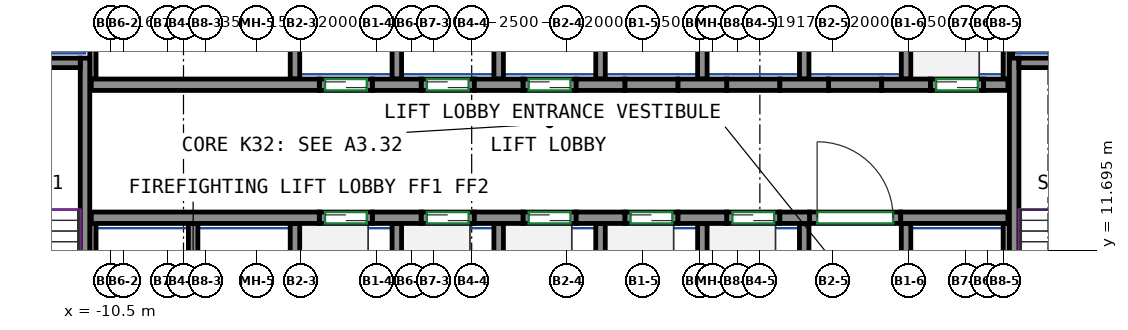
"""IFC4 building model, lengths in metres.
Left out: names, types, materials, properties, quantities, classifications, styles, units other than length and angle.
Written with IfcOpenShell. Run it as: python <this file> out.ifc"""

import sys

from ifc_helpers import new_model, si_unit, direction, frame, frame_2d, origin, place, context, subcontext, project, spatial, rectangle, extrude, source, transform, mapped, element, fill, save


model = new_model("IFC4")
c1 = context("Model", 3, precision=1e-05, world=origin(), true_north=direction((0.0, 1.0)))
c2 = subcontext(c1, "Body", "Model", "MODEL_VIEW")
j1 = project(units=[si_unit("LENGTHUNIT", "METRE"), si_unit("PLANEANGLEUNIT", "RADIAN")], contexts=[c1])
p1 = place(None, origin())
s1 = spatial("IfcSite", under=j1, at=p1, CompositionType="ELEMENT")
p2 = place(p1, origin())
s2 = spatial("IfcBuilding", under=s1, at=p2, CompositionType="ELEMENT")
p3 = place(p2, frame((0.0, 0.0, 138.5)))
s3 = spatial("IfcBuildingStorey", under=s2, at=p3, CompositionType="ELEMENT", Elevation=138.5)
m1 = source(origin(), c2, "Body", "SweptSolid", [
    extrude(rectangle(XDim=7.75, YDim=0.25, at=frame_2d((3.875, 0.0))), origin(), (0.0, 0.0, 1.0), 5.12),
])
p4 = place(p3, frame((-11.175, 9.0, 0.0), z_axis=(0.0, 0.0, 1.0), x_axis=(0.0, 1.0, 0.0)))
e1 = element("IfcWall", 1, at=p4, inside=s3, PredefinedType="SHEAR", context=c2, shape_type="MappedRepresentation", body=[
    mapped(m1, transform((0.0, 0.0, 0.0))),
])
m2 = source(origin(), c2, "Body", "SweptSolid", [
    extrude(rectangle(XDim=3.7, YDim=0.25, at=frame_2d((1.85, 0.0))), origin(), (0.0, 0.0, 1.0), 5.12),
])
p5 = place(p3, frame((-15.0, 16.625, 0.0), z_axis=(0.0, 0.0, 1.0), x_axis=(1.0, 0.0, 0.0)))
e2 = element("IfcWall", 2, at=p5, inside=s3, PredefinedType="SHEAR", context=c2, shape_type="MappedRepresentation", body=[
    mapped(m2, transform((0.0, 0.0, 0.0))),
])
p6 = place(p3, frame((13.275, 9.0, 0.0), z_axis=(0.0, 0.0, 1.0), x_axis=(0.0, 1.0, 0.0)))
e3 = element("IfcWall", 3, at=p6, inside=s3, PredefinedType="SHEAR", context=c2, shape_type="MappedRepresentation", body=[
    mapped(m1, transform((0.0, 0.0, 0.0))),
])
m3 = source(origin(), c2, "Body", "SweptSolid", [
    extrude(rectangle(XDim=3.7, YDim=0.25, at=frame_2d((1.85, 0.0))), origin(), (0.0, 0.0, 1.0), 5.12),
])
p7 = place(p3, frame((13.4, 16.625, 0.0), z_axis=(0.0, 0.0, 1.0), x_axis=(1.0, 0.0, 0.0)))
e4 = element("IfcWall", 4, at=p7, inside=s3, PredefinedType="SHEAR", context=c2, shape_type="MappedRepresentation", body=[
    mapped(m3, transform((0.0, 0.0, 0.0))),
])
m4 = source(origin(), c2, "Body", "SweptSolid", [
    extrude(rectangle(XDim=6.0, YDim=0.3, at=frame_2d((3.0, 0.0))), origin(), (0.0, 0.0, 1.0), 5.12),
])
p8 = place(p3, frame((-11.01, 12.55, 0.0), z_axis=(0.0, 0.0, 1.0), x_axis=(1.0, 0.0, 0.0)))
e5 = element("IfcWall", 5, at=p8, inside=s3, PredefinedType="SHEAR", context=c2, shape_type="MappedRepresentation", body=[
    mapped(m4, transform((0.0, 0.0, 0.0))),
])
m5 = source(origin(), c2, "Body", "SweptSolid", [
    extrude(rectangle(XDim=1.28, YDim=0.3, at=frame_2d((0.64, 0.0))), origin(), (0.0, 0.0, 1.0), 5.12),
])
for number, where, z_axis, x_axis in (
    (6, (-3.61, 12.55, 0.0), (0.0, 0.0, 1.0), (1.0, 0.0, 0.0)),
    (7, (-0.93, 12.55, 0.0), (0.0, 0.0, 1.0), (1.0, 0.0, 0.0)),
    (8, (1.75, 12.55, 0.0), (0.0, 0.0, 1.0), (1.0, 0.0, 0.0)),
    (9, (4.43, 12.55, 0.0), (0.0, 0.0, 1.0), (1.0, 0.0, 0.0)),
):
    element("IfcWall", number, at=place(p3, frame(where, z_axis=z_axis, x_axis=x_axis)), inside=s3, PredefinedType="SHEAR", context=c2, shape_type="MappedRepresentation", body=[
        mapped(m5, transform((0.0, 0.0, 0.0))),
    ])
m6 = source(origin(), c2, "Body", "SweptSolid", [
    extrude(rectangle(XDim=0.78, YDim=0.3, at=frame_2d((0.39, 0.0))), origin(), (0.0, 0.0, 1.0), 5.12),
])
p9 = place(p3, frame((7.11, 12.55, 0.0), z_axis=(0.0, 0.0, 1.0), x_axis=(1.0, 0.0, 0.0)))
e10 = element("IfcWall", 10, at=p9, inside=s3, PredefinedType="SHEAR", context=c2, shape_type="MappedRepresentation", body=[
    mapped(m6, transform((0.0, 0.0, 0.0))),
])
m7 = source(origin(), c2, "Body", "SweptSolid", [
    extrude(rectangle(XDim=2.82, YDim=0.3, at=frame_2d((1.41, 0.0))), origin(), (0.0, 0.0, 1.0), 5.12),
])
p10 = place(p3, frame((10.29, 12.55, 0.0), z_axis=(0.0, 0.0, 1.0), x_axis=(1.0, 0.0, 0.0)))
e11 = element("IfcWall", 11, at=p10, inside=s3, PredefinedType="SHEAR", context=c2, shape_type="MappedRepresentation", body=[
    mapped(m7, transform((0.0, 0.0, 0.0))),
])
p11 = place(p3, frame((-11.01, 16.05, 0.0), z_axis=(0.0, 0.0, 1.0), x_axis=(1.0, 0.0, 0.0)))
e12 = element("IfcWall", 12, at=p11, inside=s3, PredefinedType="SHEAR", context=c2, shape_type="MappedRepresentation", body=[
    mapped(m4, transform((0.0, 0.0, 0.0))),
])
for number, where, z_axis, x_axis in (
    (13, (-3.61, 16.05, 0.0), (0.0, 0.0, 1.0), (1.0, 0.0, 0.0)),
    (14, (-0.93, 16.05, 0.0), (0.0, 0.0, 1.0), (1.0, 0.0, 0.0)),
    (15, (1.75, 16.05, 0.0), (0.0, 0.0, 1.0), (1.0, 0.0, 0.0)),
    (16, (4.43, 16.05, 0.0), (0.0, 0.0, 1.0), (1.0, 0.0, 0.0)),
):
    element("IfcWall", number, at=place(p3, frame(where, z_axis=z_axis, x_axis=x_axis)), inside=s3, PredefinedType="SHEAR", context=c2, shape_type="MappedRepresentation", body=[
        mapped(m5, transform((0.0, 0.0, 0.0))),
    ])
m8 = source(origin(), c2, "Body", "SweptSolid", [
    extrude(rectangle(XDim=1.28, YDim=0.3, at=frame_2d((0.64, 0.0))), origin(), (0.0, 0.0, 1.0), 5.12),
])
p12 = place(p3, frame((7.11, 16.05, 0.0), z_axis=(0.0, 0.0, 1.0), x_axis=(1.0, 0.0, 0.0)))
e17 = element("IfcWall", 17, at=p12, inside=s3, PredefinedType="SHEAR", context=c2, shape_type="MappedRepresentation", body=[
    mapped(m8, transform((0.0, 0.0, 0.0))),
])
p13 = place(p3, frame((9.79, 16.05, 0.0), z_axis=(0.0, 0.0, 1.0), x_axis=(1.0, 0.0, 0.0)))
e18 = element("IfcWall", 18, at=p13, inside=s3, PredefinedType="SHEAR", context=c2, shape_type="MappedRepresentation", body=[
    mapped(m5, transform((0.0, 0.0, 0.0))),
])
m9 = source(origin(), c2, "Body", "SweptSolid", [
    extrude(rectangle(XDim=0.64, YDim=0.3, at=frame_2d((0.32, 0.0))), origin(), (0.0, 0.0, 1.0), 5.12),
])
p14 = place(p3, frame((12.47, 16.05, 0.0), z_axis=(0.0, 0.0, 1.0), x_axis=(1.0, 0.0, 0.0)))
e19 = element("IfcWall", 19, at=p14, inside=s3, PredefinedType="SHEAR", context=c2, shape_type="MappedRepresentation", body=[
    mapped(m9, transform((0.0, 0.0, 0.0))),
])
m10 = source(origin(), c2, "Body", "SweptSolid", [
    extrude(rectangle(XDim=1.4, YDim=0.3, at=frame_2d((0.7, 0.0))), origin(), (0.0, 0.0, 1.0), 5.12),
])
p15 = place(p3, frame((-5.01, 12.55, 0.0), z_axis=(0.0, 0.0, 1.0), x_axis=(1.0, 0.0, 0.0)))
e20 = element("IfcWall", 20, at=p15, inside=s3, PredefinedType="PARTITIONING", context=c2, shape_type="MappedRepresentation", body=[
    mapped(m10, transform((0.0, 0.0, 0.0))),
])
p16 = place(p15, frame((0.15, 0.0, 0.0)))
e21 = element("IfcOpeningElement", 21, at=p16, cuts=e20, PredefinedType="OPENING", context=c2, shape_type="SweptSolid", body=[
    extrude(rectangle(XDim=1.1, YDim=2.1, at=frame_2d((0.55, 1.05))), frame((0.0, 0.16, 0.0), z_axis=(0.0, -1.0, 0.0), x_axis=(1.0, 0.0, 0.0)), (0.0, 0.0, 1.0), 0.32),
])
m11 = source(origin(), c2, "Body", "SweptSolid", [
    extrude(rectangle(XDim=1.4, YDim=0.3, at=frame_2d((0.7, 0.0))), origin(), (0.0, 0.0, 1.0), 5.12),
])
p17 = place(p3, frame((-2.33, 12.55, 0.0), z_axis=(0.0, 0.0, 1.0), x_axis=(1.0, 0.0, 0.0)))
e22 = element("IfcWall", 22, at=p17, inside=s3, PredefinedType="PARTITIONING", context=c2, shape_type="MappedRepresentation", body=[
    mapped(m11, transform((0.0, 0.0, 0.0))),
])
p18 = place(p17, frame((0.15, 0.0, 0.0)))
e23 = element("IfcOpeningElement", 23, at=p18, cuts=e22, PredefinedType="OPENING", context=c2, shape_type="SweptSolid", body=[
    extrude(rectangle(XDim=1.1, YDim=2.1, at=frame_2d((0.55, 1.05))), frame((0.0, 0.16, 0.0), z_axis=(0.0, -1.0, 0.0), x_axis=(1.0, 0.0, 0.0)), (0.0, 0.0, 1.0), 0.32),
])
p19 = place(p3, frame((0.35, 12.55, 0.0), z_axis=(0.0, 0.0, 1.0), x_axis=(1.0, 0.0, 0.0)))
e24 = element("IfcWall", 24, at=p19, inside=s3, PredefinedType="PARTITIONING", context=c2, shape_type="MappedRepresentation", body=[
    mapped(m10, transform((0.0, 0.0, 0.0))),
])
p20 = place(p19, frame((0.15, 0.0, 0.0)))
e25 = element("IfcOpeningElement", 25, at=p20, cuts=e24, PredefinedType="OPENING", context=c2, shape_type="SweptSolid", body=[
    extrude(rectangle(XDim=1.1, YDim=2.1, at=frame_2d((0.55, 1.05))), frame((0.0, 0.16, 0.0), z_axis=(0.0, -1.0, 0.0), x_axis=(1.0, 0.0, 0.0)), (0.0, 0.0, 1.0), 0.32),
])
p21 = place(p3, frame((3.03, 12.55, 0.0), z_axis=(0.0, 0.0, 1.0), x_axis=(1.0, 0.0, 0.0)))
e26 = element("IfcWall", 26, at=p21, inside=s3, PredefinedType="PARTITIONING", context=c2, shape_type="MappedRepresentation", body=[
    mapped(m10, transform((0.0, 0.0, 0.0))),
])
p22 = place(p21, frame((0.15, 0.0, 0.0)))
e27 = element("IfcOpeningElement", 27, at=p22, cuts=e26, PredefinedType="OPENING", context=c2, shape_type="SweptSolid", body=[
    extrude(rectangle(XDim=1.1, YDim=2.1, at=frame_2d((0.55, 1.05))), frame((0.0, 0.16, 0.0), z_axis=(0.0, -1.0, 0.0), x_axis=(1.0, 0.0, 0.0)), (0.0, 0.0, 1.0), 0.32),
])
p23 = place(p3, frame((5.71, 12.55, 0.0), z_axis=(0.0, 0.0, 1.0), x_axis=(1.0, 0.0, 0.0)))
e28 = element("IfcWall", 28, at=p23, inside=s3, PredefinedType="PARTITIONING", context=c2, shape_type="MappedRepresentation", body=[
    mapped(m11, transform((0.0, 0.0, 0.0))),
])
p24 = place(p23, frame((0.15, 0.0, 0.0)))
e29 = element("IfcOpeningElement", 29, at=p24, cuts=e28, PredefinedType="OPENING", context=c2, shape_type="SweptSolid", body=[
    extrude(rectangle(XDim=1.1, YDim=2.1, at=frame_2d((0.55, 1.05))), frame((0.0, 0.16, 0.0), z_axis=(0.0, -1.0, 0.0), x_axis=(1.0, 0.0, 0.0)), (0.0, 0.0, 1.0), 0.32),
])
p25 = place(p3, frame((11.07, 16.05, 0.0), z_axis=(0.0, 0.0, 1.0), x_axis=(1.0, 0.0, 0.0)))
e30 = element("IfcWall", 30, at=p25, inside=s3, PredefinedType="PARTITIONING", context=c2, shape_type="MappedRepresentation", body=[
    mapped(m10, transform((0.0, 0.0, 0.0))),
])
p26 = place(p25, frame((0.15, 0.0, 0.0)))
e31 = element("IfcOpeningElement", 31, at=p26, cuts=e30, PredefinedType="OPENING", context=c2, shape_type="SweptSolid", body=[
    extrude(rectangle(XDim=1.1, YDim=2.1, at=frame_2d((0.55, 1.05))), frame((0.0, 0.16, 0.0), z_axis=(0.0, -1.0, 0.0), x_axis=(1.0, 0.0, 0.0)), (0.0, 0.0, 1.0), 0.32),
])
m12 = source(origin(), c2, "Body", "SweptSolid", [
    extrude(rectangle(XDim=2.4, YDim=0.3, at=frame_2d((1.2, 0.0))), origin(), (0.0, 0.0, 1.0), 5.12),
])
p27 = place(p3, frame((7.89, 12.55, 0.0), z_axis=(0.0, 0.0, 1.0), x_axis=(1.0, 0.0, 0.0)))
e32 = element("IfcWall", 32, at=p27, inside=s3, PredefinedType="PARTITIONING", context=c2, shape_type="MappedRepresentation", body=[
    mapped(m12, transform((0.0, 0.0, 0.0))),
])
p28 = place(p27, frame((0.2, 0.0, 0.0)))
e33 = element("IfcOpeningElement", 33, at=p28, cuts=e32, PredefinedType="OPENING", context=c2, shape_type="SweptSolid", body=[
    extrude(rectangle(XDim=2.0, YDim=2.1, at=frame_2d((1.0, 1.05))), frame((0.0, 0.16, 0.0), z_axis=(0.0, -1.0, 0.0), x_axis=(1.0, 0.0, 0.0)), (0.0, 0.0, 1.0), 0.32),
])
p29 = place(p3, frame((-5.01, 16.05, 0.0), z_axis=(0.0, 0.0, 1.0), x_axis=(1.0, 0.0, 0.0)))
e34 = element("IfcWall", 34, at=p29, inside=s3, PredefinedType="PARTITIONING", context=c2, shape_type="MappedRepresentation", body=[
    mapped(m10, transform((0.0, 0.0, 0.0))),
])
p30 = place(p29, frame((0.15, 0.0, 0.0)))
e35 = element("IfcOpeningElement", 35, at=p30, cuts=e34, PredefinedType="OPENING", context=c2, shape_type="SweptSolid", body=[
    extrude(rectangle(XDim=1.1, YDim=2.1, at=frame_2d((0.55, 1.05))), frame((0.0, 0.16, 0.0), z_axis=(0.0, -1.0, 0.0), x_axis=(1.0, 0.0, 0.0)), (0.0, 0.0, 1.0), 0.32),
])
p31 = place(p3, frame((-2.33, 16.05, 0.0), z_axis=(0.0, 0.0, 1.0), x_axis=(1.0, 0.0, 0.0)))
e36 = element("IfcWall", 36, at=p31, inside=s3, PredefinedType="PARTITIONING", context=c2, shape_type="MappedRepresentation", body=[
    mapped(m11, transform((0.0, 0.0, 0.0))),
])
p32 = place(p31, frame((0.15, 0.0, 0.0)))
e37 = element("IfcOpeningElement", 37, at=p32, cuts=e36, PredefinedType="OPENING", context=c2, shape_type="SweptSolid", body=[
    extrude(rectangle(XDim=1.1, YDim=2.1, at=frame_2d((0.55, 1.05))), frame((0.0, 0.16, 0.0), z_axis=(0.0, -1.0, 0.0), x_axis=(1.0, 0.0, 0.0)), (0.0, 0.0, 1.0), 0.32),
])
p33 = place(p3, frame((0.35, 16.05, 0.0), z_axis=(0.0, 0.0, 1.0), x_axis=(1.0, 0.0, 0.0)))
e38 = element("IfcWall", 38, at=p33, inside=s3, PredefinedType="PARTITIONING", context=c2, shape_type="MappedRepresentation", body=[
    mapped(m10, transform((0.0, 0.0, 0.0))),
])
p34 = place(p33, frame((0.15, 0.0, 0.0)))
e39 = element("IfcOpeningElement", 39, at=p34, cuts=e38, PredefinedType="OPENING", context=c2, shape_type="SweptSolid", body=[
    extrude(rectangle(XDim=1.1, YDim=2.1, at=frame_2d((0.55, 1.05))), frame((0.0, 0.16, 0.0), z_axis=(0.0, -1.0, 0.0), x_axis=(1.0, 0.0, 0.0)), (0.0, 0.0, 1.0), 0.32),
])
p35 = place(p3, frame((3.03, 16.05, 0.0), z_axis=(0.0, 0.0, 1.0), x_axis=(1.0, 0.0, 0.0)))
e40 = element("IfcWall", 40, at=p35, inside=s3, PredefinedType="PARTITIONING", context=c2, shape_type="MappedRepresentation", body=[
    mapped(m10, transform((0.0, 0.0, 0.0))),
])
for number, where, z_axis, x_axis in (
    (41, (5.71, 16.05, 0.0), (0.0, 0.0, 1.0), (1.0, 0.0, 0.0)),
    (42, (8.39, 16.05, 0.0), (0.0, 0.0, 1.0), (1.0, 0.0, 0.0)),
):
    element("IfcWall", number, at=place(p3, frame(where, z_axis=z_axis, x_axis=x_axis)), inside=s3, PredefinedType="PARTITIONING", context=c2, shape_type="MappedRepresentation", body=[
        mapped(m11, transform((0.0, 0.0, 0.0))),
    ])
m13 = source(origin(), c2, "Body", "SweptSolid", [
    extrude(rectangle(XDim=3.275, YDim=0.165, at=frame_2d((1.638, 0.0))), origin(), (0.0, 0.0, 1.0), 5.12),
])
p36 = place(p3, frame((13.067, 16.2, 0.0), z_axis=(0.0, 0.0, 1.0), x_axis=(0.0, 1.0, 0.0)))
e43 = element("IfcWall", 43, at=p36, inside=s3, PredefinedType="PARTITIONING", context=c2, shape_type="MappedRepresentation", body=[
    mapped(m13, transform((0.0, 0.0, 0.0))),
])
m14 = source(origin(), c2, "Body", "SweptSolid", [
    extrude(rectangle(XDim=4.8, YDim=0.165, at=frame_2d((2.4, 0.0))), origin(), (0.0, 0.0, 1.0), 5.12),
])
p37 = place(p3, frame((-10.968, 16.2, 0.0), z_axis=(0.0, 0.0, 1.0), x_axis=(0.0, 1.0, 0.0)))
e44 = element("IfcWall", 44, at=p37, inside=s3, PredefinedType="PARTITIONING", context=c2, shape_type="MappedRepresentation", body=[
    mapped(m14, transform((0.0, 0.0, 0.0))),
])
m15 = source(origin(), c2, "Body", "SweptSolid", [
    extrude(rectangle(XDim=3.275, YDim=0.25, at=frame_2d((1.638, 0.0))), origin(), (0.0, 0.0, 1.0), 5.12),
])
p38 = place(p3, frame((10.43, 16.2, 0.0), z_axis=(0.0, 0.0, 1.0), x_axis=(0.0, 1.0, 0.0)))
e45 = element("IfcWall", 45, at=p38, inside=s3, PredefinedType="PARTITIONING", context=c2, shape_type="MappedRepresentation", body=[
    mapped(m15, transform((0.0, 0.0, 0.0))),
])
m16 = source(origin(), c2, "Body", "SweptSolid", [
    extrude(rectangle(XDim=2.725, YDim=0.085, at=frame_2d((1.363, 0.0))), origin(), (0.0, 0.0, 1.0), 5.12),
])
p39 = place(p3, frame((13.192, 16.75, 0.0), z_axis=(0.0, 0.0, 1.0), x_axis=(0.0, 1.0, 0.0)))
e46 = element("IfcWall", 46, at=p39, inside=s3, PredefinedType="PARTITIONING", context=c2, shape_type="MappedRepresentation", body=[
    mapped(m16, transform((0.0, 0.0, 0.0))),
])
for number, where, z_axis, x_axis in (
    (47, (2.39, 16.2, 0.0), (0.0, 0.0, 1.0), (0.0, 1.0, 0.0)),
    (48, (5.07, 16.2, 0.0), (0.0, 0.0, 1.0), (0.0, 1.0, 0.0)),
    (49, (7.75, 16.2, 0.0), (0.0, 0.0, 1.0), (0.0, 1.0, 0.0)),
    (50, (-0.29, 16.2, 0.0), (0.0, 0.0, 1.0), (0.0, 1.0, 0.0)),
    (51, (-2.97, 16.2, 0.0), (0.0, 0.0, 1.0), (0.0, 1.0, 0.0)),
    (52, (-5.65, 16.2, 0.0), (0.0, 0.0, 1.0), (0.0, 1.0, 0.0)),
):
    element("IfcWall", number, at=place(p3, frame(where, z_axis=z_axis, x_axis=x_axis)), inside=s3, PredefinedType="PARTITIONING", context=c2, shape_type="MappedRepresentation", body=[
        mapped(m15, transform((0.0, 0.0, 0.0))),
    ])
m17 = source(origin(), c2, "Body", "SweptSolid", [
    extrude(rectangle(XDim=3.4, YDim=0.25, at=frame_2d((1.7, 0.0))), origin(), (0.0, 0.0, 1.0), 5.12),
])
p40 = place(p3, frame((10.43, 9.0, 0.0), z_axis=(0.0, 0.0, 1.0), x_axis=(0.0, 1.0, 0.0)))
e53 = element("IfcWall", 53, at=p40, inside=s3, PredefinedType="PARTITIONING", context=c2, shape_type="MappedRepresentation", body=[
    mapped(m17, transform((0.0, 0.0, 0.0))),
])
m18 = source(origin(), c2, "Body", "SweptSolid", [
    extrude(rectangle(XDim=3.4, YDim=0.165, at=frame_2d((1.7, 0.0))), origin(), (0.0, 0.0, 1.0), 5.12),
])
p41 = place(p3, frame((13.067, 9.0, 0.0), z_axis=(0.0, 0.0, 1.0), x_axis=(0.0, 1.0, 0.0)))
e54 = element("IfcWall", 54, at=p41, inside=s3, PredefinedType="PARTITIONING", context=c2, shape_type="MappedRepresentation", body=[
    mapped(m18, transform((0.0, 0.0, 0.0))),
])
for number, where, z_axis, x_axis in (
    (55, (2.39, 9.0, 0.0), (0.0, 0.0, 1.0), (0.0, 1.0, 0.0)),
    (56, (5.07, 9.0, 0.0), (0.0, 0.0, 1.0), (0.0, 1.0, 0.0)),
    (57, (7.75, 9.0, 0.0), (0.0, 0.0, 1.0), (0.0, 1.0, 0.0)),
    (58, (-0.29, 9.0, 0.0), (0.0, 0.0, 1.0), (0.0, 1.0, 0.0)),
):
    element("IfcWall", number, at=place(p3, frame(where, z_axis=z_axis, x_axis=x_axis)), inside=s3, PredefinedType="PARTITIONING", context=c2, shape_type="MappedRepresentation", body=[
        mapped(m17, transform((0.0, 0.0, 0.0))),
    ])
p42 = place(p3, frame((-10.968, 9.0, 0.0), z_axis=(0.0, 0.0, 1.0), x_axis=(0.0, 1.0, 0.0)))
e59 = element("IfcWall", 59, at=p42, inside=s3, PredefinedType="PARTITIONING", context=c2, shape_type="MappedRepresentation", body=[
    mapped(m18, transform((0.0, 0.0, 0.0))),
])
for number, where, z_axis, x_axis in (
    (60, (-2.97, 9.0, 0.0), (0.0, 0.0, 1.0), (0.0, 1.0, 0.0)),
    (61, (-5.65, 9.0, 0.0), (0.0, 0.0, 1.0), (0.0, 1.0, 0.0)),
    (62, (-8.33, 9.0, 0.0), (0.0, 0.0, 1.0), (0.0, 1.0, 0.0)),
):
    element("IfcWall", number, at=place(p3, frame(where, z_axis=z_axis, x_axis=x_axis)), inside=s3, PredefinedType="PARTITIONING", context=c2, shape_type="MappedRepresentation", body=[
        mapped(m17, transform((0.0, 0.0, 0.0))),
    ])
p43 = place(p28, origin())
e63 = element("IfcDoor", 63, at=p43, inside=s3, OperationType="DOUBLE_DOOR_SINGLE_SWING", PredefinedType="DOOR", context=c2, shape_type="SweptSolid", body=[
    extrude(rectangle(XDim=2.0, YDim=2.1, at=frame_2d((1.0, 1.05))), frame((0.0, 0.025, 0.0), z_axis=(0.0, -1.0, 0.0), x_axis=(1.0, 0.0, 0.0)), (0.0, 0.0, 1.0), 0.05),
])
fill(e33, e63)
p44 = place(p16, origin())
e64 = element("IfcDoor", 64, at=p44, inside=s3, OperationType="DOUBLE_DOOR_SLIDING", PredefinedType="DOOR", context=c2, shape_type="SweptSolid", body=[
    extrude(rectangle(XDim=1.1, YDim=2.1, at=frame_2d((0.55, 1.05))), frame((0.0, 0.025, 0.0), z_axis=(0.0, -1.0, 0.0), x_axis=(1.0, 0.0, 0.0)), (0.0, 0.0, 1.0), 0.05),
])
fill(e21, e64)
p45 = place(p18, origin())
e65 = element("IfcDoor", 65, at=p45, inside=s3, OperationType="DOUBLE_DOOR_SLIDING", PredefinedType="DOOR", context=c2, shape_type="SweptSolid", body=[
    extrude(rectangle(XDim=1.1, YDim=2.1, at=frame_2d((0.55, 1.05))), frame((0.0, 0.025, 0.0), z_axis=(0.0, -1.0, 0.0), x_axis=(1.0, 0.0, 0.0)), (0.0, 0.0, 1.0), 0.05),
])
fill(e23, e65)
p46 = place(p20, origin())
e66 = element("IfcDoor", 66, at=p46, inside=s3, OperationType="DOUBLE_DOOR_SLIDING", PredefinedType="DOOR", context=c2, shape_type="SweptSolid", body=[
    extrude(rectangle(XDim=1.1, YDim=2.1, at=frame_2d((0.55, 1.05))), frame((0.0, 0.025, 0.0), z_axis=(0.0, -1.0, 0.0), x_axis=(1.0, 0.0, 0.0)), (0.0, 0.0, 1.0), 0.05),
])
fill(e25, e66)
p47 = place(p22, origin())
e67 = element("IfcDoor", 67, at=p47, inside=s3, OperationType="DOUBLE_DOOR_SLIDING", PredefinedType="DOOR", context=c2, shape_type="SweptSolid", body=[
    extrude(rectangle(XDim=1.1, YDim=2.1, at=frame_2d((0.55, 1.05))), frame((0.0, 0.025, 0.0), z_axis=(0.0, -1.0, 0.0), x_axis=(1.0, 0.0, 0.0)), (0.0, 0.0, 1.0), 0.05),
])
fill(e27, e67)
p48 = place(p24, origin())
e68 = element("IfcDoor", 68, at=p48, inside=s3, OperationType="DOUBLE_DOOR_SLIDING", PredefinedType="DOOR", context=c2, shape_type="SweptSolid", body=[
    extrude(rectangle(XDim=1.1, YDim=2.1, at=frame_2d((0.55, 1.05))), frame((0.0, 0.025, 0.0), z_axis=(0.0, -1.0, 0.0), x_axis=(1.0, 0.0, 0.0)), (0.0, 0.0, 1.0), 0.05),
])
fill(e29, e68)
p49 = place(p26, origin())
e69 = element("IfcDoor", 69, at=p49, inside=s3, OperationType="DOUBLE_DOOR_SLIDING", PredefinedType="DOOR", context=c2, shape_type="SweptSolid", body=[
    extrude(rectangle(XDim=1.1, YDim=2.1, at=frame_2d((0.55, 1.05))), frame((0.0, 0.025, 0.0), z_axis=(0.0, -1.0, 0.0), x_axis=(1.0, 0.0, 0.0)), (0.0, 0.0, 1.0), 0.05),
])
fill(e31, e69)
p50 = place(p30, origin())
e70 = element("IfcDoor", 70, at=p50, inside=s3, OperationType="DOUBLE_DOOR_SLIDING", PredefinedType="DOOR", context=c2, shape_type="SweptSolid", body=[
    extrude(rectangle(XDim=1.1, YDim=2.1, at=frame_2d((0.55, 1.05))), frame((0.0, 0.025, 0.0), z_axis=(0.0, -1.0, 0.0), x_axis=(1.0, 0.0, 0.0)), (0.0, 0.0, 1.0), 0.05),
])
fill(e35, e70)
p51 = place(p32, origin())
e71 = element("IfcDoor", 71, at=p51, inside=s3, OperationType="DOUBLE_DOOR_SLIDING", PredefinedType="DOOR", context=c2, shape_type="SweptSolid", body=[
    extrude(rectangle(XDim=1.1, YDim=2.1, at=frame_2d((0.55, 1.05))), frame((0.0, 0.025, 0.0), z_axis=(0.0, -1.0, 0.0), x_axis=(1.0, 0.0, 0.0)), (0.0, 0.0, 1.0), 0.05),
])
fill(e37, e71)
p52 = place(p34, origin())
e72 = element("IfcDoor", 72, at=p52, inside=s3, OperationType="DOUBLE_DOOR_SLIDING", PredefinedType="DOOR", context=c2, shape_type="SweptSolid", body=[
    extrude(rectangle(XDim=1.1, YDim=2.1, at=frame_2d((0.55, 1.05))), frame((0.0, 0.025, 0.0), z_axis=(0.0, -1.0, 0.0), x_axis=(1.0, 0.0, 0.0)), (0.0, 0.0, 1.0), 0.05),
])
fill(e39, e72)
save(model, sys.argv[1])
